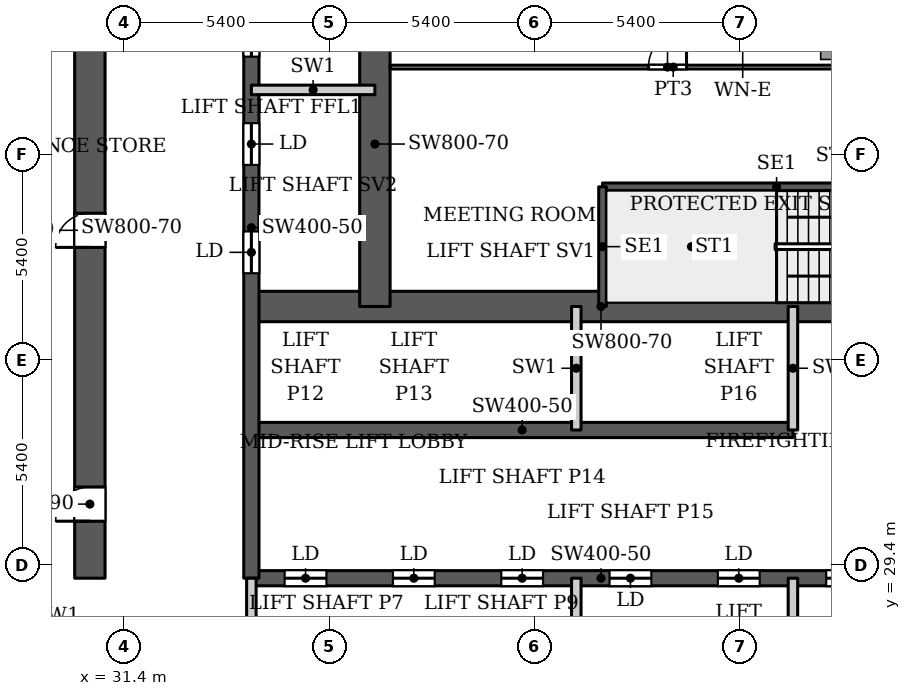
"""IFC4 building model, lengths in metres.
Left out: names, types, materials, properties, quantities, classifications, styles, units other than length and angle.
Written with IfcOpenShell. Run it as: python <this file> out.ifc"""

import sys

from ifc_helpers import new_model, si_unit, direction, frame, frame_2d, origin, place, context, subcontext, project, spatial, rectangle, extrude, source, transform, mapped, element, fill, save


model = new_model("IFC4")
c1 = context("Model", 3, precision=1e-05, world=origin(), true_north=direction((0.0, 1.0)))
c2 = subcontext(c1, "Body", "Model", "MODEL_VIEW")
j1 = project(units=[si_unit("LENGTHUNIT", "METRE"), si_unit("PLANEANGLEUNIT", "RADIAN")], contexts=[c1])
p1 = place(None, origin())
s1 = spatial("IfcSite", under=j1, at=p1, CompositionType="ELEMENT")
p2 = place(p1, origin())
s2 = spatial("IfcBuilding", under=s1, at=p2, CompositionType="ELEMENT")
p3 = place(p2, frame((0.0, 0.0, 191.6)))
s3 = spatial("IfcBuildingStorey", under=s2, at=p3, CompositionType="ELEMENT", Elevation=191.6)
p4 = place(p3, frame((34.75, 29.05, 0.0), z_axis=(0.0, 0.0, 1.0), x_axis=(1.0, 0.0, 0.0)))
e1 = element("IfcWall", 1, at=p4, inside=s3, PredefinedType="SHEAR", context=c2, shape_type="SweptSolid", body=[
    extrude(rectangle(XDim=18.4, YDim=0.4, at=frame_2d((9.2, 0.0))), origin(), (0.0, 0.0, 1.0), 3.9),
])
p5 = place(p4, frame((0.875, 0.0, 0.0)))
e2 = element("IfcOpeningElement", 2, at=p5, cuts=e1, PredefinedType="OPENING", context=c2, shape_type="SweptSolid", body=[
    extrude(rectangle(XDim=1.1, YDim=2.2, at=frame_2d((0.55, 1.1))), frame((0.0, 0.21, 0.0), z_axis=(0.0, -1.0, 0.0), x_axis=(1.0, 0.0, 0.0)), (0.0, 0.0, 1.0), 0.42),
])
p6 = place(p4, frame((3.725, 0.0, 0.0)))
e3 = element("IfcOpeningElement", 3, at=p6, cuts=e1, PredefinedType="OPENING", context=c2, shape_type="SweptSolid", body=[
    extrude(rectangle(XDim=1.1, YDim=2.2, at=frame_2d((0.55, 1.1))), frame((0.0, 0.21, 0.0), z_axis=(0.0, -1.0, 0.0), x_axis=(1.0, 0.0, 0.0)), (0.0, 0.0, 1.0), 0.42),
])
p7 = place(p4, frame((6.575, 0.0, 0.0)))
e4 = element("IfcOpeningElement", 4, at=p7, cuts=e1, PredefinedType="OPENING", context=c2, shape_type="SweptSolid", body=[
    extrude(rectangle(XDim=1.1, YDim=2.2, at=frame_2d((0.55, 1.1))), frame((0.0, 0.21, 0.0), z_axis=(0.0, -1.0, 0.0), x_axis=(1.0, 0.0, 0.0)), (0.0, 0.0, 1.0), 0.42),
])
p8 = place(p4, frame((9.425, 0.0, 0.0)))
e5 = element("IfcOpeningElement", 5, at=p8, cuts=e1, PredefinedType="OPENING", context=c2, shape_type="SweptSolid", body=[
    extrude(rectangle(XDim=1.1, YDim=2.2, at=frame_2d((0.55, 1.1))), frame((0.0, 0.21, 0.0), z_axis=(0.0, -1.0, 0.0), x_axis=(1.0, 0.0, 0.0)), (0.0, 0.0, 1.0), 0.42),
])
p9 = place(p4, frame((12.275, 0.0, 0.0)))
e6 = element("IfcOpeningElement", 6, at=p9, cuts=e1, PredefinedType="OPENING", context=c2, shape_type="SweptSolid", body=[
    extrude(rectangle(XDim=1.1, YDim=2.2, at=frame_2d((0.55, 1.1))), frame((0.0, 0.21, 0.0), z_axis=(0.0, -1.0, 0.0), x_axis=(1.0, 0.0, 0.0)), (0.0, 0.0, 1.0), 0.42),
])
p10 = place(p4, frame((15.125, 0.0, 0.0)))
e7 = element("IfcOpeningElement", 7, at=p10, cuts=e1, PredefinedType="OPENING", context=c2, shape_type="SweptSolid", body=[
    extrude(rectangle(XDim=1.1, YDim=2.2, at=frame_2d((0.55, 1.1))), frame((0.0, 0.21, 0.0), z_axis=(0.0, -1.0, 0.0), x_axis=(1.0, 0.0, 0.0)), (0.0, 0.0, 1.0), 0.42),
])
p11 = place(p3, frame((34.75, 32.95, 0.0), z_axis=(0.0, 0.0, 1.0), x_axis=(1.0, 0.0, 0.0)))
e8 = element("IfcWall", 8, at=p11, inside=s3, PredefinedType="SHEAR", context=c2, shape_type="SweptSolid", body=[
    extrude(rectangle(XDim=14.25, YDim=0.4, at=frame_2d((7.125, 0.0))), origin(), (0.0, 0.0, 1.0), 3.9),
])
p12 = place(p3, frame((34.75, 36.2, 0.0), z_axis=(0.0, 0.0, 1.0), x_axis=(1.0, 0.0, 0.0)))
e9 = element("IfcWall", 9, at=p12, inside=s3, PredefinedType="SHEAR", context=c2, shape_type="SweptSolid", body=[
    extrude(rectangle(XDim=18.4, YDim=0.8, at=frame_2d((9.2, 0.0))), origin(), (0.0, 0.0, 1.0), 3.9),
])
p13 = place(p12, frame((16.9, 0.0, 0.0)))
e10 = element("IfcOpeningElement", 10, at=p13, cuts=e9, PredefinedType="OPENING", context=c2, shape_type="SweptSolid", body=[
    extrude(rectangle(XDim=1.0, YDim=2.2, at=frame_2d((0.5, 1.1))), frame((0.0, 0.41, 0.0), z_axis=(0.0, -1.0, 0.0), x_axis=(1.0, 0.0, 0.0)), (0.0, 0.0, 1.0), 0.82),
])
p14 = place(p3, frame((34.75, 29.05, 0.0), z_axis=(0.0, 0.0, 1.0), x_axis=(0.0, 1.0, 0.0)))
e11 = element("IfcWall", 11, at=p14, inside=s3, PredefinedType="SHEAR", context=c2, shape_type="SweptSolid", body=[
    extrude(rectangle(XDim=18.45, YDim=0.4, at=frame_2d((9.225, 0.0))), origin(), (0.0, 0.0, 1.0), 3.9),
])
p15 = place(p14, frame((8.025, 0.0, 0.0)))
e12 = element("IfcOpeningElement", 12, at=p15, cuts=e11, PredefinedType="OPENING", context=c2, shape_type="SweptSolid", body=[
    extrude(rectangle(XDim=1.1, YDim=2.2, at=frame_2d((0.55, 1.1))), frame((0.0, 0.21, 0.0), z_axis=(0.0, -1.0, 0.0), x_axis=(1.0, 0.0, 0.0)), (0.0, 0.0, 1.0), 0.42),
])
p16 = place(p14, frame((10.875, 0.0, 0.0)))
e13 = element("IfcOpeningElement", 13, at=p16, cuts=e11, PredefinedType="OPENING", context=c2, shape_type="SweptSolid", body=[
    extrude(rectangle(XDim=1.1, YDim=2.2, at=frame_2d((0.55, 1.1))), frame((0.0, 0.21, 0.0), z_axis=(0.0, -1.0, 0.0), x_axis=(1.0, 0.0, 0.0)), (0.0, 0.0, 1.0), 0.42),
])
p17 = place(p14, frame((13.725, 0.0, 0.0)))
e14 = element("IfcOpeningElement", 14, at=p17, cuts=e11, PredefinedType="OPENING", context=c2, shape_type="SweptSolid", body=[
    extrude(rectangle(XDim=1.1, YDim=2.2, at=frame_2d((0.55, 1.1))), frame((0.0, 0.21, 0.0), z_axis=(0.0, -1.0, 0.0), x_axis=(1.0, 0.0, 0.0)), (0.0, 0.0, 1.0), 0.42),
])
p18 = place(p14, frame((15.95, 0.0, 0.0)))
e15 = element("IfcOpeningElement", 15, at=p18, cuts=e11, PredefinedType="OPENING", context=c2, shape_type="SweptSolid", body=[
    extrude(rectangle(XDim=1.1, YDim=2.2, at=frame_2d((0.55, 1.1))), frame((0.0, 0.21, 0.0), z_axis=(0.0, -1.0, 0.0), x_axis=(1.0, 0.0, 0.0)), (0.0, 0.0, 1.0), 0.42),
])
p19 = place(p3, frame((38.0, 36.2, 0.0), z_axis=(0.0, 0.0, 1.0), x_axis=(0.0, 1.0, 0.0)))
e16 = element("IfcWall", 16, at=p19, inside=s3, PredefinedType="SHEAR", context=c2, shape_type="SweptSolid", body=[
    extrude(rectangle(XDim=8.55, YDim=0.8, at=frame_2d((4.275, 0.0))), origin(), (0.0, 0.0, 1.0), 3.9),
])
p20 = place(p3, frame((30.5, 29.05, 0.0), z_axis=(0.0, 0.0, 1.0), x_axis=(0.0, 1.0, 0.0)))
e17 = element("IfcWall", 17, at=p20, inside=s3, PredefinedType="SHEAR", context=c2, shape_type="SweptSolid", body=[
    extrude(rectangle(XDim=18.45, YDim=0.8, at=frame_2d((9.225, 0.0))), origin(), (0.0, 0.0, 1.0), 3.9),
])
p21 = place(p20, frame((1.5, 0.0, 0.0)))
e18 = element("IfcOpeningElement", 18, at=p21, cuts=e17, PredefinedType="OPENING", context=c2, shape_type="SweptSolid", body=[
    extrude(rectangle(XDim=0.9, YDim=2.2, at=frame_2d((0.45, 1.1))), frame((0.0, 0.41, 0.0), z_axis=(0.0, -1.0, 0.0), x_axis=(1.0, 0.0, 0.0)), (0.0, 0.0, 1.0), 0.82),
])
p22 = place(p20, frame((8.705, 0.0, 0.0)))
e19 = element("IfcOpeningElement", 19, at=p22, cuts=e17, PredefinedType="OPENING", context=c2, shape_type="SweptSolid", body=[
    extrude(rectangle(XDim=0.9, YDim=2.2, at=frame_2d((0.45, 1.1))), frame((0.0, 0.41, 0.0), z_axis=(0.0, -1.0, 0.0), x_axis=(1.0, 0.0, 0.0)), (0.0, 0.0, 1.0), 0.82),
])
p23 = place(p3, frame((29.712, 26.072, 0.0), z_axis=(0.0, 0.0, 1.0), x_axis=(-0.511028049012, 0.859564036662, 0.0)))
e20 = element("IfcWall", 20, at=p23, inside=s3, PredefinedType="SOLIDWALL", context=c2, shape_type="SweptSolid", body=[
    extrude(rectangle(XDim=4.634, YDim=0.25, at=frame_2d((2.317, 0.0))), origin(), (0.0, 0.0, 1.0), 3.147),
])
p24 = place(p3, frame((27.195, 31.969, 0.0), z_axis=(0.0, 0.0, 1.0), x_axis=(0.052554995867, 0.998618031286, 0.0)))
e21 = element("IfcWall", 21, at=p24, inside=s3, PredefinedType="SOLIDWALL", context=c2, shape_type="SweptSolid", body=[
    extrude(rectangle(XDim=66.787, YDim=0.25, at=frame_2d((33.394, 0.0))), origin(), (0.0, 0.0, 1.0), 3.75),
])
p25 = place(p3, frame((43.99, 39.35, 0.0), z_axis=(0.0, 0.0, 1.0), x_axis=(1.0, 0.0, 0.0)))
e22 = element("IfcWall", 22, at=p25, inside=s3, PredefinedType="SHEAR", context=c2, shape_type="SweptSolid", body=[
    extrude(rectangle(XDim=9.16, YDim=0.2, at=frame_2d((4.58, 0.0))), origin(), (0.0, 0.0, 1.0), 3.9),
])
p26 = place(p3, frame((43.99, 36.2, 0.0), z_axis=(0.0, 0.0, 1.0), x_axis=(0.0, 1.0, 0.0)))
e23 = element("IfcWall", 23, at=p26, inside=s3, PredefinedType="SHEAR", context=c2, shape_type="SweptSolid", body=[
    extrude(rectangle(XDim=3.15, YDim=0.2, at=frame_2d((1.575, 0.0))), origin(), (0.0, 0.0, 1.0), 3.9),
])
for number, where, z_axis, x_axis in (
    (24, (34.75, 25.8, 0.0), (0.0, 0.0, 1.0), (0.0, 1.0, 0.0)),
    (25, (43.3, 25.8, 0.0), (0.0, 0.0, 1.0), (0.0, 1.0, 0.0)),
    (26, (43.3, 32.95, 0.0), (0.0, 0.0, 1.0), (0.0, 1.0, 0.0)),
    (27, (49.0, 25.8, 0.0), (0.0, 0.0, 1.0), (0.0, 1.0, 0.0)),
    (28, (49.0, 32.95, 0.0), (0.0, 0.0, 1.0), (0.0, 1.0, 0.0)),
    (29, (34.75, 41.9, 0.0), (0.0, 0.0, 1.0), (1.0, 0.0, 0.0)),
):
    element("IfcWall", number, at=place(p3, frame(where, z_axis=z_axis, x_axis=x_axis)), inside=s3, PredefinedType="PARTITIONING", context=c2, shape_type="SweptSolid", body=[
        extrude(rectangle(XDim=3.25, YDim=0.25, at=frame_2d((1.625, 0.0))), origin(), (0.0, 0.0, 1.0), 3.9),
    ])
p27 = place(p3, frame((38.399, 42.5, 0.0), z_axis=(0.0, 0.0, 1.0), x_axis=(1.0, 0.0, 0.0)))
e30 = element("IfcWall", 30, at=p27, inside=s3, PredefinedType="PARTITIONING", context=c2, shape_type="SweptSolid", body=[
    extrude(rectangle(XDim=14.901, YDim=0.1, at=frame_2d((7.451, 0.0))), origin(), (0.0, 0.0, 1.0), 3.6),
])
p28 = place(p27, frame((6.801, 0.0, 0.0)))
e31 = element("IfcOpeningElement", 31, at=p28, cuts=e30, PredefinedType="OPENING", context=c2, shape_type="SweptSolid", body=[
    extrude(rectangle(XDim=1.0, YDim=2.1, at=frame_2d((0.5, 1.05))), frame((0.0, 0.06, 0.0), z_axis=(0.0, -1.0, 0.0), x_axis=(1.0, 0.0, 0.0)), (0.0, 0.0, 1.0), 0.12),
])
m1 = source(origin(), c2, "Body", "SweptSolid", [
    extrude(rectangle(XDim=1.1, YDim=2.2, at=frame_2d((0.55, 1.1))), frame((0.0, 0.025, 0.0), z_axis=(0.0, -1.0, 0.0), x_axis=(1.0, 0.0, 0.0)), (0.0, 0.0, 1.0), 0.05),
])
p29 = place(p5, origin())
e32 = element("IfcDoor", 32, at=p29, inside=s3, OperationType="SLIDING_TO_LEFT", PredefinedType="DOOR", context=c2, shape_type="MappedRepresentation", body=[
    mapped(m1, transform((0.0, 0.0, 0.0), x_axis=(1.0, 0.0, 0.0), y_axis=(0.0, 1.0, 0.0), z_axis=(0.0, 0.0, 1.0), scale=1.0)),
])
fill(e2, e32)
p30 = place(p6, origin())
e33 = element("IfcDoor", 33, at=p30, inside=s3, OperationType="SLIDING_TO_LEFT", PredefinedType="DOOR", context=c2, shape_type="MappedRepresentation", body=[
    mapped(m1, transform((0.0, 0.0, 0.0), x_axis=(1.0, 0.0, 0.0), y_axis=(0.0, 1.0, 0.0), z_axis=(0.0, 0.0, 1.0), scale=1.0)),
])
fill(e3, e33)
p31 = place(p7, origin())
e34 = element("IfcDoor", 34, at=p31, inside=s3, OperationType="SLIDING_TO_LEFT", PredefinedType="DOOR", context=c2, shape_type="MappedRepresentation", body=[
    mapped(m1, transform((0.0, 0.0, 0.0), x_axis=(1.0, 0.0, 0.0), y_axis=(0.0, 1.0, 0.0), z_axis=(0.0, 0.0, 1.0), scale=1.0)),
])
fill(e4, e34)
p32 = place(p8, origin())
e35 = element("IfcDoor", 35, at=p32, inside=s3, OperationType="SLIDING_TO_LEFT", PredefinedType="DOOR", context=c2, shape_type="MappedRepresentation", body=[
    mapped(m1, transform((0.0, 0.0, 0.0), x_axis=(1.0, 0.0, 0.0), y_axis=(0.0, 1.0, 0.0), z_axis=(0.0, 0.0, 1.0), scale=1.0)),
])
fill(e5, e35)
p33 = place(p9, origin())
e36 = element("IfcDoor", 36, at=p33, inside=s3, OperationType="SLIDING_TO_LEFT", PredefinedType="DOOR", context=c2, shape_type="MappedRepresentation", body=[
    mapped(m1, transform((0.0, 0.0, 0.0), x_axis=(1.0, 0.0, 0.0), y_axis=(0.0, 1.0, 0.0), z_axis=(0.0, 0.0, 1.0), scale=1.0)),
])
fill(e6, e36)
p34 = place(p15, origin())
e37 = element("IfcDoor", 37, at=p34, inside=s3, OperationType="SLIDING_TO_LEFT", PredefinedType="DOOR", context=c2, shape_type="MappedRepresentation", body=[
    mapped(m1, transform((0.0, 0.0, 0.0), x_axis=(1.0, 0.0, 0.0), y_axis=(0.0, 1.0, 0.0), z_axis=(0.0, 0.0, 1.0), scale=1.0)),
])
fill(e12, e37)
p35 = place(p16, origin())
e38 = element("IfcDoor", 38, at=p35, inside=s3, OperationType="SLIDING_TO_LEFT", PredefinedType="DOOR", context=c2, shape_type="MappedRepresentation", body=[
    mapped(m1, transform((0.0, 0.0, 0.0), x_axis=(1.0, 0.0, 0.0), y_axis=(0.0, 1.0, 0.0), z_axis=(0.0, 0.0, 1.0), scale=1.0)),
])
fill(e13, e38)
p36 = place(p17, origin())
e39 = element("IfcDoor", 39, at=p36, inside=s3, OperationType="SLIDING_TO_LEFT", PredefinedType="DOOR", context=c2, shape_type="MappedRepresentation", body=[
    mapped(m1, transform((0.0, 0.0, 0.0), x_axis=(1.0, 0.0, 0.0), y_axis=(0.0, 1.0, 0.0), z_axis=(0.0, 0.0, 1.0), scale=1.0)),
])
fill(e14, e39)
p37 = place(p10, origin())
e40 = element("IfcDoor", 40, at=p37, inside=s3, OperationType="SLIDING_TO_LEFT", PredefinedType="DOOR", context=c2, shape_type="MappedRepresentation", body=[
    mapped(m1, transform((0.0, 0.0, 0.0), x_axis=(1.0, 0.0, 0.0), y_axis=(0.0, 1.0, 0.0), z_axis=(0.0, 0.0, 1.0), scale=1.0)),
])
fill(e7, e40)
m2 = source(origin(), c2, "Body", "SweptSolid", [
    extrude(rectangle(XDim=0.9, YDim=2.2, at=frame_2d((0.45, 1.1))), frame((0.0, 0.025, 0.0), z_axis=(0.0, -1.0, 0.0), x_axis=(1.0, 0.0, 0.0)), (0.0, 0.0, 1.0), 0.05),
])
p38 = place(p21, origin())
e41 = element("IfcDoor", 41, at=p38, inside=s3, OperationType="SINGLE_SWING_LEFT", PredefinedType="DOOR", context=c2, shape_type="MappedRepresentation", body=[
    mapped(m2, transform((0.0, 0.0, 0.0), x_axis=(1.0, 0.0, 0.0), y_axis=(0.0, 1.0, 0.0), z_axis=(0.0, 0.0, 1.0), scale=1.0)),
])
fill(e18, e41)
p39 = place(p22, origin())
e42 = element("IfcDoor", 42, at=p39, inside=s3, OperationType="SINGLE_SWING_LEFT", PredefinedType="DOOR", context=c2, shape_type="MappedRepresentation", body=[
    mapped(m2, transform((0.0, 0.0, 0.0), x_axis=(1.0, 0.0, 0.0), y_axis=(0.0, 1.0, 0.0), z_axis=(0.0, 0.0, 1.0), scale=1.0)),
])
fill(e19, e42)
m3 = source(origin(), c2, "Body", "SweptSolid", [
    extrude(rectangle(XDim=1.0, YDim=2.1, at=frame_2d((0.5, 1.05))), frame((0.0, 0.025, 0.0), z_axis=(0.0, -1.0, 0.0), x_axis=(1.0, 0.0, 0.0)), (0.0, 0.0, 1.0), 0.05),
])
p40 = place(p28, origin())
e43 = element("IfcDoor", 43, at=p40, inside=s3, OperationType="SINGLE_SWING_LEFT", PredefinedType="DOOR", context=c2, shape_type="MappedRepresentation", body=[
    mapped(m3, transform((0.0, 0.0, 0.0), x_axis=(1.0, 0.0, 0.0), y_axis=(0.0, 1.0, 0.0), z_axis=(0.0, 0.0, 1.0), scale=1.0)),
])
fill(e31, e43)
save(model, sys.argv[1])
